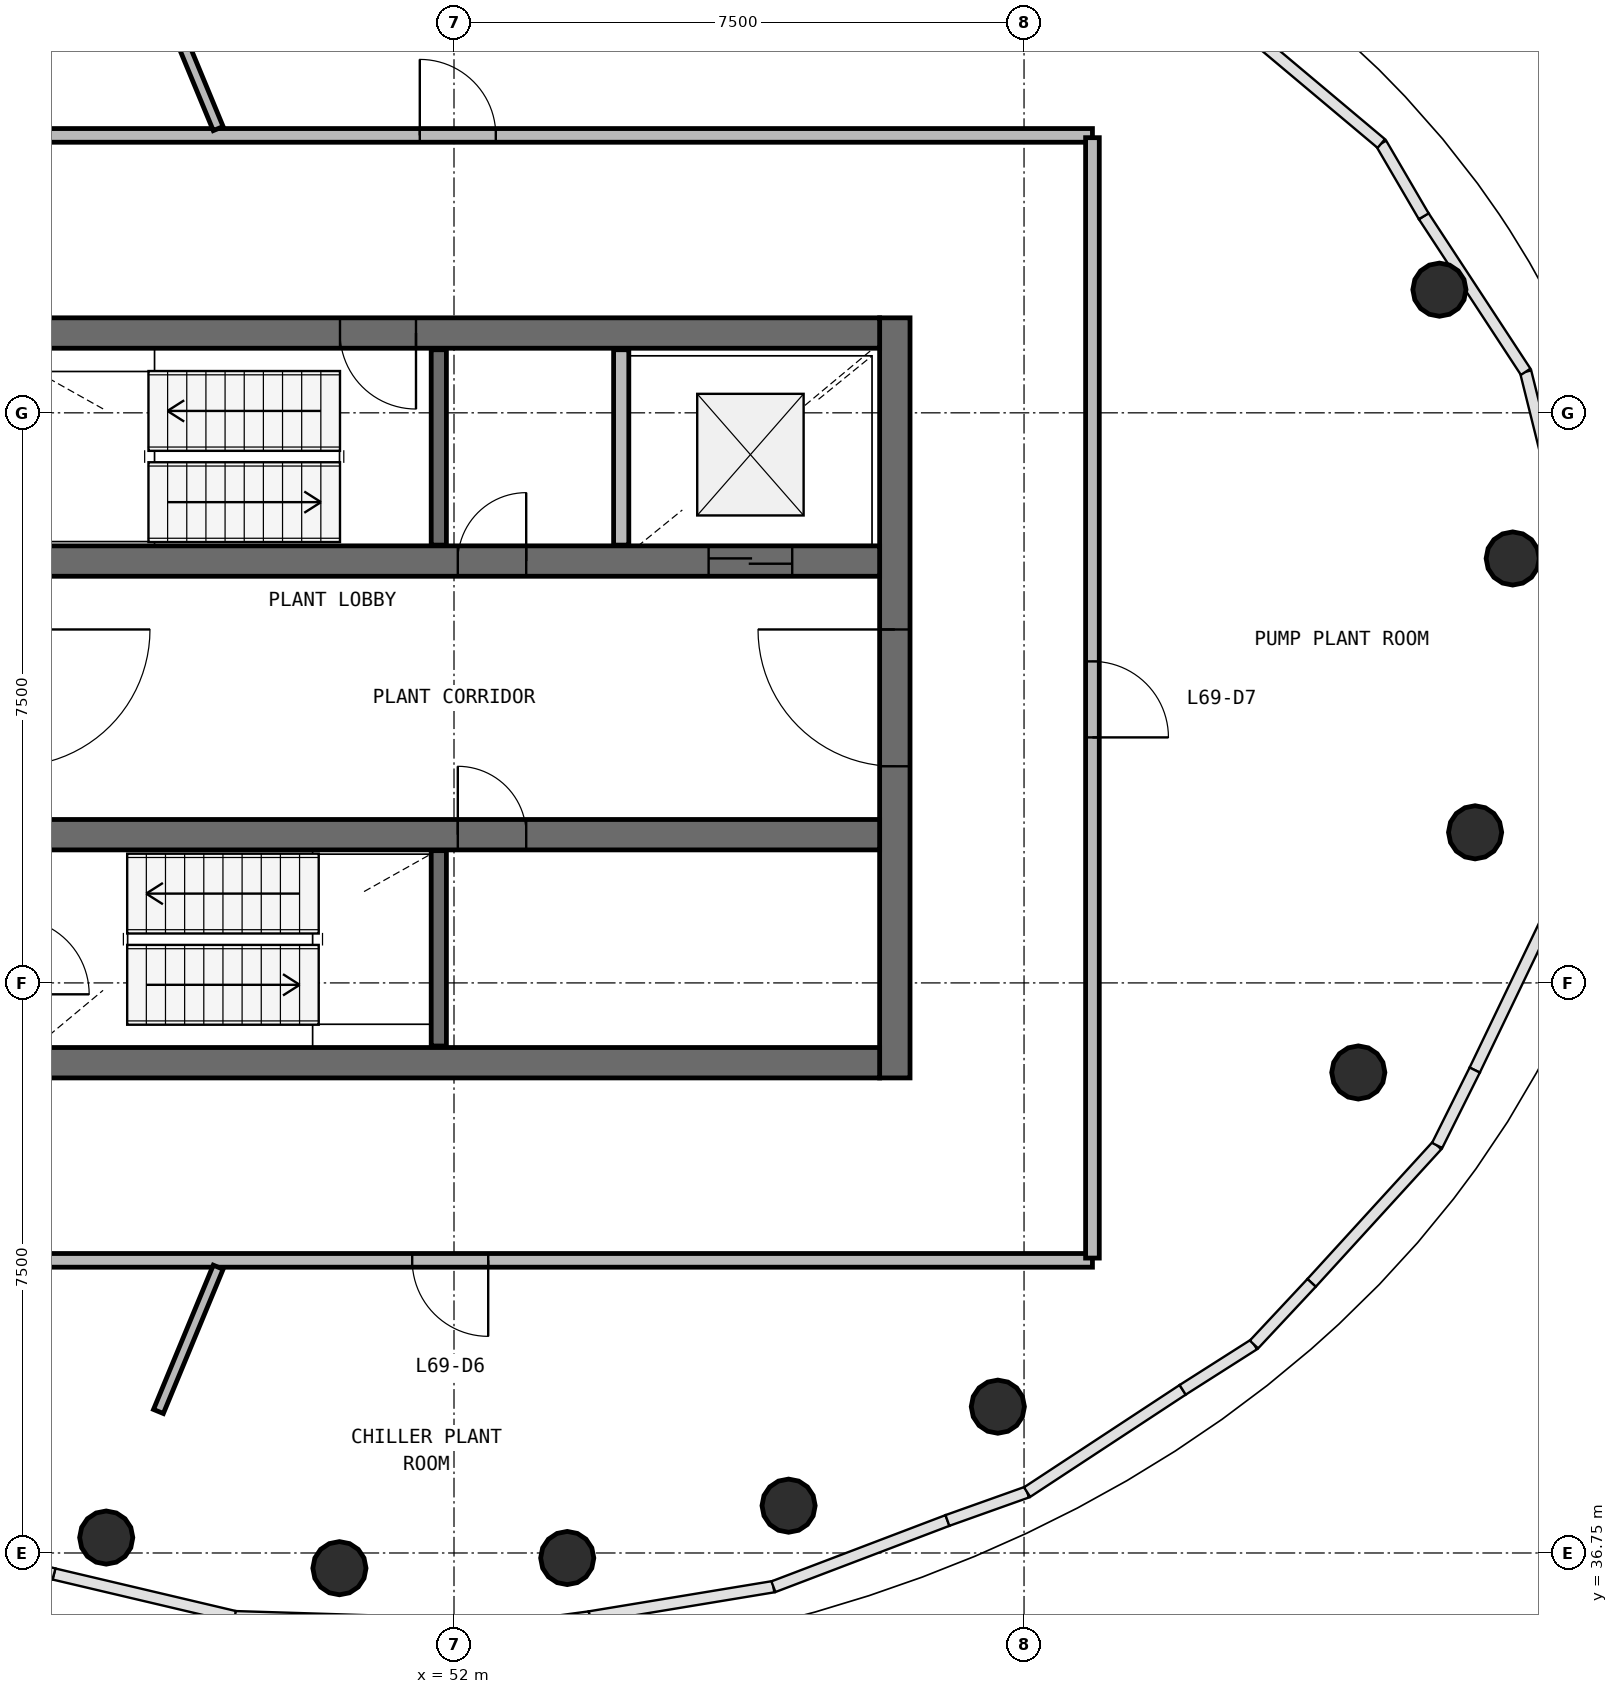
"""IFC4 building model, lengths in metres.
Left out: names, types, materials, properties, quantities, classifications, styles, units other than length and angle.
Written with IfcOpenShell. Run it as: python <this file> out.ifc"""

import sys

from ifc_helpers import new_model, si_unit, direction, frame, frame_2d, origin, origin_2d, place, context, subcontext, project, spatial, rectangle, circle, extrude, source, transform, mapped, element, fill, save


model = new_model("IFC4")
c1 = context("Model", 3, precision=1e-05, world=origin(), true_north=direction((0.0, 1.0)))
c2 = subcontext(c1, "Body", "Model", "MODEL_VIEW")
j1 = project(units=[si_unit("LENGTHUNIT", "METRE"), si_unit("PLANEANGLEUNIT", "RADIAN")], contexts=[c1])
p1 = place(None, origin())
s1 = spatial("IfcSite", under=j1, at=p1, CompositionType="ELEMENT")
p2 = place(p1, origin())
s2 = spatial("IfcBuilding", under=s1, at=p2, CompositionType="ELEMENT")
p3 = place(p2, frame((0.0, 0.0, 280.1)))
s3 = spatial("IfcBuildingStorey", under=s2, at=p3, CompositionType="ELEMENT", Elevation=280.1)
p4 = place(p3, frame((57.8, 43.0, 0.0), z_axis=(0.0, 0.0, 1.0), x_axis=(0.0, 1.0, 0.0)))
e1 = element("IfcWall", 1, at=p4, inside=s3, PredefinedType="SHEAR", context=c2, shape_type="SweptSolid", body=[
    extrude(rectangle(XDim=10.0, YDim=0.4, at=frame_2d((5.0, 0.0))), origin(), (0.0, 0.0, 1.0), 3.5),
])
p5 = place(p4, frame((4.1, 0.0, 0.0)))
e2 = element("IfcOpeningElement", 2, at=p5, cuts=e1, PredefinedType="OPENING", context=c2, shape_type="SweptSolid", body=[
    extrude(rectangle(XDim=1.8, YDim=2.1, at=frame_2d((0.9, 1.05))), frame((0.0, 0.21, 0.0), z_axis=(0.0, -1.0, 0.0), x_axis=(1.0, 0.0, 0.0)), (0.0, 0.0, 1.0), 0.42),
])
p6 = place(p3, frame((46.4, 43.2, 0.0), z_axis=(0.0, 0.0, 1.0), x_axis=(1.0, 0.0, 0.0)))
e3 = element("IfcWall", 3, at=p6, inside=s3, PredefinedType="SHEAR", context=c2, shape_type="SweptSolid", body=[
    extrude(rectangle(XDim=11.2, YDim=0.4, at=frame_2d((5.6, 0.0))), origin(), (0.0, 0.0, 1.0), 3.5),
])
p7 = place(p3, frame((57.6, 52.8, 0.0), z_axis=(0.0, 0.0, 1.0), x_axis=(-1.0, 0.0, 0.0)))
e4 = element("IfcWall", 4, at=p7, inside=s3, PredefinedType="SHEAR", context=c2, shape_type="SweptSolid", body=[
    extrude(rectangle(XDim=11.2, YDim=0.4, at=frame_2d((5.6, 0.0))), origin(), (0.0, 0.0, 1.0), 3.5),
])
p8 = place(p7, frame((6.1, 0.0, 0.0)))
e5 = element("IfcOpeningElement", 5, at=p8, cuts=e4, PredefinedType="OPENING", context=c2, shape_type="SweptSolid", body=[
    extrude(rectangle(XDim=1.0, YDim=2.1, at=frame_2d((0.5, 1.05))), frame((0.0, 0.21, 0.0), z_axis=(0.0, -1.0, 0.0), x_axis=(1.0, 0.0, 0.0)), (0.0, 0.0, 1.0), 0.42),
])
p9 = place(p3, frame((46.4, 49.8, 0.0), z_axis=(0.0, 0.0, 1.0), x_axis=(1.0, 0.0, 0.0)))
e6 = element("IfcWall", 6, at=p9, inside=s3, PredefinedType="SHEAR", context=c2, shape_type="SweptSolid", body=[
    extrude(rectangle(XDim=11.2, YDim=0.4, at=frame_2d((5.6, 0.0))), origin(), (0.0, 0.0, 1.0), 3.5),
])
p10 = place(p9, frame((8.95, 0.0, 0.0)))
e7 = element("IfcOpeningElement", 7, at=p10, cuts=e6, PredefinedType="OPENING", context=c2, shape_type="SweptSolid", body=[
    extrude(rectangle(XDim=1.1, YDim=2.1, at=frame_2d((0.55, 1.05))), frame((0.0, 0.21, 0.0), z_axis=(0.0, -1.0, 0.0), x_axis=(1.0, 0.0, 0.0)), (0.0, 0.0, 1.0), 0.42),
])
p11 = place(p9, frame((5.65, 0.0, 0.0)))
e8 = element("IfcOpeningElement", 8, at=p11, cuts=e6, PredefinedType="OPENING", context=c2, shape_type="SweptSolid", body=[
    extrude(rectangle(XDim=0.9, YDim=2.1, at=frame_2d((0.45, 1.05))), frame((0.0, 0.21, 0.0), z_axis=(0.0, -1.0, 0.0), x_axis=(1.0, 0.0, 0.0)), (0.0, 0.0, 1.0), 0.42),
])
p12 = place(p3, frame((46.4, 46.2, 0.0), z_axis=(0.0, 0.0, 1.0), x_axis=(1.0, 0.0, 0.0)))
e9 = element("IfcWall", 9, at=p12, inside=s3, PredefinedType="SHEAR", context=c2, shape_type="SweptSolid", body=[
    extrude(rectangle(XDim=11.2, YDim=0.4, at=frame_2d((5.6, 0.0))), origin(), (0.0, 0.0, 1.0), 3.5),
])
p13 = place(p12, frame((5.65, 0.0, 0.0)))
e10 = element("IfcOpeningElement", 10, at=p13, cuts=e9, PredefinedType="OPENING", context=c2, shape_type="SweptSolid", body=[
    extrude(rectangle(XDim=0.9, YDim=2.1, at=frame_2d((0.45, 1.05))), frame((0.0, 0.21, 0.0), z_axis=(0.0, -1.0, 0.0), x_axis=(1.0, 0.0, 0.0)), (0.0, 0.0, 1.0), 0.42),
])
m1 = source(origin(), c2, "Body", "SweptSolid", [
    extrude(circle(Radius=0.35, at=origin_2d()), origin(), (0.0, 0.0, 1.0), 4.014),
])
p14 = place(p3, frame((65.929, 49.834, 0.174), z_axis=(-0.485556516608, -0.063978639212, 0.871860999761), x_axis=(0.130634394046, -0.991430610326, 0.0)))
e11 = element("IfcColumn", 11, at=p14, inside=s3, PredefinedType="COLUMN", context=c2, shape_type="MappedRepresentation", body=[
    mapped(m1, transform((0.0, 0.0, 0.0), scale=1.0)),
])
m2 = source(origin(), c2, "Body", "SweptSolid", [
    extrude(circle(Radius=0.35, at=origin_2d()), origin(), (0.0, 0.0, 1.0), 4.069),
])
p15 = place(p3, frame((64.965, 53.37, 0.181), z_axis=(-0.471313444732, -0.195280710616, 0.860075043747), x_axis=(0.382777607766, -0.923840518159, 0.0)))
e12 = element("IfcColumn", 12, at=p15, inside=s3, PredefinedType="COLUMN", context=c2, shape_type="MappedRepresentation", body=[
    mapped(m2, transform((0.0, 0.0, 0.0), scale=1.0)),
])
m3 = source(origin(), c2, "Body", "SweptSolid", [
    extrude(circle(Radius=0.35, at=origin_2d()), origin(), (0.0, 0.0, 1.0), 3.908),
])
p16 = place(p3, frame((59.672, 57.998, 0.159), z_axis=(-0.270876761649, -0.352901943394, 0.89559254036), x_axis=(0.793260428126, -0.608882495371, 0.0)))
e13 = element("IfcColumn", 13, at=p16, inside=s3, PredefinedType="COLUMN", context=c2, shape_type="MappedRepresentation", body=[
    mapped(m3, transform((0.0, 0.0, 0.0), scale=1.0)),
])
m4 = source(origin(), c2, "Body", "SweptSolid", [
    extrude(circle(Radius=0.35, at=origin_2d()), origin(), (0.0, 0.0, 1.0), 3.834),
])
p17 = place(p3, frame((47.424, 36.953, 0.146), z_axis=(0.156087835133, 0.377005297426, 0.912964179712), x_axis=(-0.923942661325, 0.382530990356, 0.0)))
e14 = element("IfcColumn", 14, at=p17, inside=s3, PredefinedType="COLUMN", context=c2, shape_type="MappedRepresentation", body=[
    mapped(m4, transform((0.0, 0.0, 0.0), scale=1.0)),
])
m5 = source(origin(), c2, "Body", "SweptSolid", [
    extrude(circle(Radius=0.35, at=origin_2d()), origin(), (0.0, 0.0, 1.0), 3.784),
])
p18 = place(p3, frame((50.493, 36.55, 0.136), z_axis=(0.049610189762, 0.377076149752, 0.924852640349), x_axis=(-0.991456027497, 0.130441349041, 0.0)))
e15 = element("IfcColumn", 15, at=p18, inside=s3, PredefinedType="COLUMN", context=c2, shape_type="MappedRepresentation", body=[
    mapped(m5, transform((0.0, 0.0, 0.0), scale=1.0)),
])
m6 = source(origin(), c2, "Body", "SweptSolid", [
    extrude(circle(Radius=0.35, at=origin_2d()), origin(), (0.0, 0.0, 1.0), 3.759),
])
p19 = place(p3, frame((53.49, 36.684, 0.131), z_axis=(-0.047604004307, 0.361803421548, 0.93103820702), x_axis=(-0.991454901274, -0.130449908927, 0.0)))
e16 = element("IfcColumn", 16, at=p19, inside=s3, PredefinedType="COLUMN", context=c2, shape_type="MappedRepresentation", body=[
    mapped(m6, transform((0.0, 0.0, 0.0), scale=1.0)),
])
m7 = source(origin(), c2, "Body", "SweptSolid", [
    extrude(circle(Radius=0.35, at=origin_2d()), origin(), (0.0, 0.0, 1.0), 3.747),
])
p20 = place(p3, frame((56.402, 37.372, 0.128), z_axis=(-0.136574670104, 0.329773094178, 0.934129041323), x_axis=(-0.923901142315, -0.382631257517, 0.0)))
e17 = element("IfcColumn", 17, at=p20, inside=s3, PredefinedType="COLUMN", context=c2, shape_type="MappedRepresentation", body=[
    mapped(m7, transform((0.0, 0.0, 0.0), scale=1.0)),
])
m8 = source(origin(), c2, "Body", "SweptSolid", [
    extrude(circle(Radius=0.35, at=origin_2d()), origin(), (0.0, 0.0, 1.0), 3.739),
])
p21 = place(p3, frame((59.155, 38.675, 0.126), z_axis=(-0.213995199353, 0.278905552773, 0.936171857773), x_axis=(-0.793376088289, -0.608731782094, 0.0)))
e18 = element("IfcColumn", 18, at=p21, inside=s3, PredefinedType="COLUMN", context=c2, shape_type="MappedRepresentation", body=[
    mapped(m8, transform((0.0, 0.0, 0.0), scale=1.0)),
])
m9 = source(origin(), c2, "Body", "SweptSolid", [
    extrude(circle(Radius=0.35, at=origin_2d()), origin(), (0.0, 0.0, 1.0), 3.807),
])
p22 = place(p3, frame((63.898, 43.072, 0.141), z_axis=(-0.363645996148, 0.150626775693, 0.919278610613), x_axis=(-0.382682721486, -0.923879826967, 0.0)))
e19 = element("IfcColumn", 19, at=p22, inside=s3, PredefinedType="COLUMN", context=c2, shape_type="MappedRepresentation", body=[
    mapped(m9, transform((0.0, 0.0, 0.0), scale=1.0)),
])
m10 = source(origin(), c2, "Body", "SweptSolid", [
    extrude(circle(Radius=0.35, at=origin_2d()), origin(), (0.0, 0.0, 1.0), 3.898),
])
p23 = place(p3, frame((65.435, 46.231, 0.157), z_axis=(-0.436525820631, 0.057493644669, 0.897852821316), x_axis=(-0.130579616175, -0.991437826512, 0.0)))
e20 = element("IfcColumn", 20, at=p23, inside=s3, PredefinedType="COLUMN", context=c2, shape_type="MappedRepresentation", body=[
    mapped(m10, transform((0.0, 0.0, 0.0), scale=1.0)),
])
for number, where, z_axis, x_axis in (
    (21, (51.8, 43.42, 0.0), (0.0, 0.0, 1.0), (0.0, 1.0, 0.0)),
    (22, (51.8, 50.01, 0.0), (0.0, 0.0, 1.0), (0.0, 1.0, 0.0)),
    (23, (54.2, 52.58, 0.0), (0.0, 0.0, 1.0), (0.0, -1.0, 0.0)),
):
    element("IfcWall", number, at=place(p3, frame(where, z_axis=z_axis, x_axis=x_axis)), inside=s3, PredefinedType="SOLIDWALL", context=c2, shape_type="SweptSolid", body=[
        extrude(rectangle(XDim=2.57, YDim=0.2, at=frame_2d((1.285, 0.0))), origin(), (0.0, 0.0, 1.0), 3.22),
    ])
p24 = place(p3, frame((43.6, 55.4, 0.0), z_axis=(0.0, 0.0, 1.0), x_axis=(1.0, 0.0, 0.0)))
e24 = element("IfcWall", 24, at=p24, inside=s3, PredefinedType="PARTITIONING", context=c2, shape_type="SweptSolid", body=[
    extrude(rectangle(XDim=16.8, YDim=0.18, at=frame_2d((8.4, 0.0))), origin(), (0.0, 0.0, 1.0), 2.62),
])
p25 = place(p24, frame((7.95, 0.0, 0.0)))
e25 = element("IfcOpeningElement", 25, at=p25, cuts=e24, PredefinedType="OPENING", context=c2, shape_type="SweptSolid", body=[
    extrude(rectangle(XDim=1.0, YDim=2.1, at=frame_2d((0.5, 1.05))), frame((0.0, 0.1, 0.0), z_axis=(0.0, -1.0, 0.0), x_axis=(1.0, 0.0, 0.0)), (0.0, 0.0, 1.0), 0.2),
])
p26 = place(p3, frame((60.4, 40.6, 0.0), z_axis=(0.0, 0.0, 1.0), x_axis=(-1.0, 0.0, 0.0)))
e26 = element("IfcWall", 26, at=p26, inside=s3, PredefinedType="PARTITIONING", context=c2, shape_type="SweptSolid", body=[
    extrude(rectangle(XDim=16.8, YDim=0.18, at=frame_2d((8.4, 0.0))), origin(), (0.0, 0.0, 1.0), 2.62),
])
p27 = place(p26, frame((7.95, 0.0, 0.0)))
e27 = element("IfcOpeningElement", 27, at=p27, cuts=e26, PredefinedType="OPENING", context=c2, shape_type="SweptSolid", body=[
    extrude(rectangle(XDim=1.0, YDim=2.1, at=frame_2d((0.5, 1.05))), frame((0.0, 0.1, 0.0), z_axis=(0.0, -1.0, 0.0), x_axis=(1.0, 0.0, 0.0)), (0.0, 0.0, 1.0), 0.2),
])
p28 = place(p3, frame((60.4, 55.37, 0.0), z_axis=(0.0, 0.0, 1.0), x_axis=(0.0, -1.0, 0.0)))
e28 = element("IfcWall", 28, at=p28, inside=s3, PredefinedType="PARTITIONING", context=c2, shape_type="SweptSolid", body=[
    extrude(rectangle(XDim=14.74, YDim=0.18, at=frame_2d((7.37, 0.0))), origin(), (0.0, 0.0, 1.0), 2.62),
])
p29 = place(p28, frame((6.89, 0.0, 0.0)))
e29 = element("IfcOpeningElement", 29, at=p29, cuts=e28, PredefinedType="OPENING", context=c2, shape_type="SweptSolid", body=[
    extrude(rectangle(XDim=1.0, YDim=2.1, at=frame_2d((0.5, 1.05))), frame((0.0, 0.1, 0.0), z_axis=(0.0, -1.0, 0.0), x_axis=(1.0, 0.0, 0.0)), (0.0, 0.0, 1.0), 0.2),
])
p30 = place(p3, frame((48.897, 40.51, 0.0), z_axis=(0.0, 0.0, 1.0), x_axis=(-0.382691072611, -0.923876367781, 0.0)))
e30 = element("IfcWall", 30, at=p30, inside=s3, PredefinedType="PARTITIONING", context=c2, shape_type="SweptSolid", body=[
    extrude(rectangle(XDim=2.055, YDim=0.14, at=frame_2d((1.027, 0.0))), origin(), (0.0, 0.0, 1.0), 2.62),
])
p31 = place(p3, frame((48.897, 55.49, 0.0), z_axis=(0.0, 0.0, 1.0), x_axis=(-0.382630688808, 0.923901377844, 0.0)))
e31 = element("IfcWall", 31, at=p31, inside=s3, PredefinedType="PARTITIONING", context=c2, shape_type="SweptSolid", body=[
    extrude(rectangle(XDim=3.041, YDim=0.14, at=frame_2d((1.521, 0.0))), origin(), (0.0, 0.0, 1.0), 2.62),
])
m11 = source(origin(), c2, "Body", "SweptSolid", [
    extrude(rectangle(XDim=1.8, YDim=2.1, at=frame_2d((0.9, 1.05))), frame((0.0, 0.025, 0.0), z_axis=(0.0, -1.0, 0.0), x_axis=(1.0, 0.0, 0.0)), (0.0, 0.0, 1.0), 0.05),
])
p32 = place(p5, origin())
e32 = element("IfcDoor", 32, at=p32, inside=s3, OperationType="SINGLE_SWING_RIGHT", PredefinedType="DOOR", context=c2, shape_type="MappedRepresentation", body=[
    mapped(m11, transform((0.0, 0.0, 0.0), scale=1.0)),
])
fill(e2, e32)
m12 = source(origin(), c2, "Body", "SweptSolid", [
    extrude(rectangle(XDim=1.0, YDim=2.1, at=frame_2d((0.5, 1.05))), frame((0.0, 0.025, 0.0), z_axis=(0.0, -1.0, 0.0), x_axis=(1.0, 0.0, 0.0)), (0.0, 0.0, 1.0), 0.05),
])
p33 = place(p8, origin())
e33 = element("IfcDoor", 33, at=p33, inside=s3, OperationType="SINGLE_SWING_LEFT", PredefinedType="DOOR", context=c2, shape_type="MappedRepresentation", body=[
    mapped(m12, transform((0.0, 0.0, 0.0), scale=1.0)),
])
fill(e5, e33)
m13 = source(origin(), c2, "Body", "SweptSolid", [
    extrude(rectangle(XDim=1.1, YDim=2.1, at=frame_2d((0.55, 1.05))), frame((0.0, 0.025, 0.0), z_axis=(0.0, -1.0, 0.0), x_axis=(1.0, 0.0, 0.0)), (0.0, 0.0, 1.0), 0.05),
])
p34 = place(p10, origin())
e34 = element("IfcDoor", 34, at=p34, inside=s3, OperationType="DOUBLE_DOOR_SLIDING", PredefinedType="USERDEFINED", context=c2, shape_type="MappedRepresentation", body=[
    mapped(m13, transform((0.0, 0.0, 0.0), scale=1.0)),
])
fill(e7, e34)
m14 = source(origin(), c2, "Body", "SweptSolid", [
    extrude(rectangle(XDim=1.0, YDim=2.1, at=frame_2d((0.5, 1.05))), frame((0.0, 0.025, 0.0), z_axis=(0.0, -1.0, 0.0), x_axis=(1.0, 0.0, 0.0)), (0.0, 0.0, 1.0), 0.05),
])
p35 = place(p27, origin())
e35 = element("IfcDoor", 35, at=p35, inside=s3, OperationType="SINGLE_SWING_LEFT", PredefinedType="DOOR", context=c2, shape_type="MappedRepresentation", body=[
    mapped(m14, transform((0.0, 0.0, 0.0), scale=1.0)),
])
fill(e27, e35)
p36 = place(p29, origin())
e36 = element("IfcDoor", 36, at=p36, inside=s3, OperationType="SINGLE_SWING_RIGHT", PredefinedType="DOOR", context=c2, shape_type="MappedRepresentation", body=[
    mapped(m14, transform((0.0, 0.0, 0.0), scale=1.0)),
])
fill(e29, e36)
p37 = place(p25, origin())
e37 = element("IfcDoor", 37, at=p37, inside=s3, OperationType="SINGLE_SWING_LEFT", PredefinedType="DOOR", context=c2, shape_type="MappedRepresentation", body=[
    mapped(m14, transform((0.0, 0.0, 0.0), scale=1.0)),
])
fill(e25, e37)
m15 = source(origin(), c2, "Body", "SweptSolid", [
    extrude(rectangle(XDim=0.9, YDim=2.1, at=frame_2d((0.45, 1.05))), frame((0.0, 0.025, 0.0), z_axis=(0.0, -1.0, 0.0), x_axis=(1.0, 0.0, 0.0)), (0.0, 0.0, 1.0), 0.05),
])
p38 = place(p11, origin())
e38 = element("IfcDoor", 38, at=p38, inside=s3, OperationType="SINGLE_SWING_RIGHT", PredefinedType="DOOR", context=c2, shape_type="MappedRepresentation", body=[
    mapped(m15, transform((0.0, 0.0, 0.0), scale=1.0)),
])
fill(e8, e38)
p39 = place(p13, origin())
e39 = element("IfcDoor", 39, at=p39, inside=s3, OperationType="SINGLE_SWING_LEFT", PredefinedType="DOOR", context=c2, shape_type="MappedRepresentation", body=[
    mapped(m15, transform((0.0, 0.0, 0.0), scale=1.0)),
])
fill(e10, e39)
save(model, sys.argv[1])
